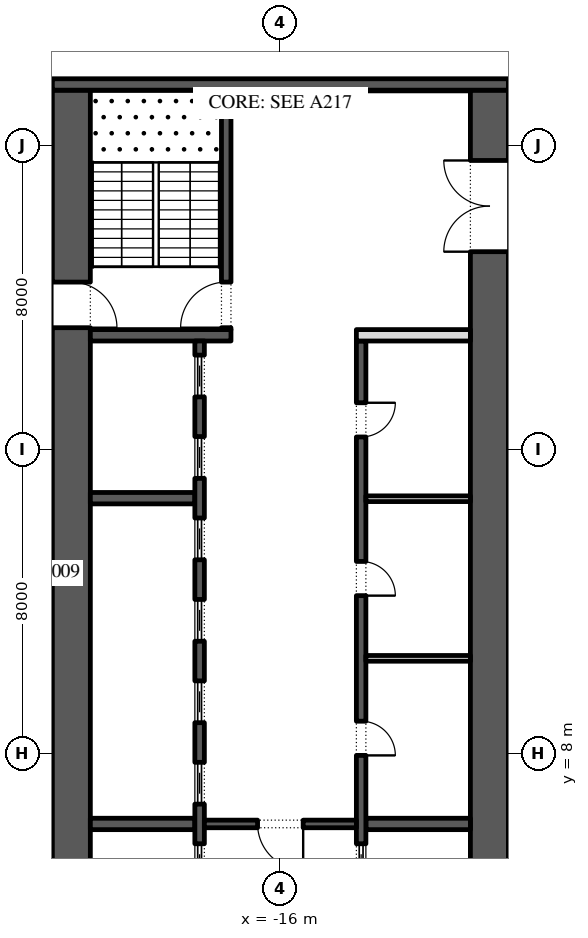
"""IFC4 building model, lengths in metres.
Left out: names, types, materials, properties, quantities, classifications, styles, units other than length and angle.
Written with IfcOpenShell. Run it as: python <this file> out.ifc"""

import sys

from ifc_helpers import new_model, si_unit, direction, frame, frame_2d, origin, place, context, subcontext, project, spatial, rectangle, extrude, element, fill, save


model = new_model("IFC4")
c1 = context("Model", 3, precision=1e-05, world=origin(), true_north=direction((0.0, 1.0)))
c2 = subcontext(c1, "Body", "Model", "MODEL_VIEW")
j1 = project(units=[si_unit("LENGTHUNIT", "METRE"), si_unit("PLANEANGLEUNIT", "RADIAN")], contexts=[c1])
p1 = place(None, origin())
s1 = spatial("IfcSite", under=j1, at=p1, CompositionType="ELEMENT")
p2 = place(p1, origin())
s2 = spatial("IfcBuilding", under=s1, at=p2, CompositionType="ELEMENT")
p3 = place(p2, frame((0.0, 0.0, 69.0)))
s3 = spatial("IfcBuildingStorey", under=s2, at=p3, CompositionType="ELEMENT", Elevation=69.0)
p4 = place(p3, frame((-21.5, -2.45, 0.0), z_axis=(0.0, 0.0, 1.0), x_axis=(0.0, 1.0, 0.0)))
e1 = element("IfcWall", 1, at=p4, inside=s3, PredefinedType="SHEAR", context=c2, shape_type="SweptSolid", body=[
    extrude(rectangle(XDim=27.9, YDim=1.0, at=frame_2d((13.95, 0.0))), origin(), (0.0, 0.0, 1.0), 4.0),
])
p5 = place(p4, frame((5.05, 0.0, 0.0)))
e2 = element("IfcOpeningElement", 2, at=p5, cuts=e1, PredefinedType="OPENING", context=c2, shape_type="SweptSolid", body=[
    extrude(rectangle(XDim=1.2, YDim=2.1, at=frame_2d((0.6, 1.05))), frame((0.0, 0.51, 0.0), z_axis=(0.0, -1.0, 0.0), x_axis=(1.0, 0.0, 0.0)), (0.0, 0.0, 1.0), 1.02),
])
p6 = place(p4, frame((21.65, 0.0, 0.0)))
e3 = element("IfcOpeningElement", 3, at=p6, cuts=e1, PredefinedType="OPENING", context=c2, shape_type="SweptSolid", body=[
    extrude(rectangle(XDim=1.2, YDim=2.1, at=frame_2d((0.6, 1.05))), frame((0.0, 0.51, 0.0), z_axis=(0.0, -1.0, 0.0), x_axis=(1.0, 0.0, 0.0)), (0.0, 0.0, 1.0), 1.02),
])
p7 = place(p3, frame((-10.5, -2.45, 0.0), z_axis=(0.0, 0.0, 1.0), x_axis=(0.0, 1.0, 0.0)))
e4 = element("IfcWall", 4, at=p7, inside=s3, PredefinedType="SHEAR", context=c2, shape_type="SweptSolid", body=[
    extrude(rectangle(XDim=27.9, YDim=1.0, at=frame_2d((13.95, 0.0))), origin(), (0.0, 0.0, 1.0), 4.0),
])
p8 = place(p7, frame((23.65, 0.0, 0.0)))
e5 = element("IfcOpeningElement", 5, at=p8, cuts=e4, PredefinedType="OPENING", context=c2, shape_type="SweptSolid", body=[
    extrude(rectangle(XDim=2.4, YDim=2.1, at=frame_2d((1.2, 1.05))), frame((0.0, 0.51, 0.0), z_axis=(0.0, -1.0, 0.0), x_axis=(1.0, 0.0, 0.0)), (0.0, 0.0, 1.0), 1.02),
])
p9 = place(p7, frame((0.788, 0.0, 0.0)))
e6 = element("IfcOpeningElement", 6, at=p9, cuts=e4, PredefinedType="OPENING", context=c2, shape_type="SweptSolid", body=[
    extrude(rectangle(XDim=0.9, YDim=2.1, at=frame_2d((0.45, 1.05))), frame((0.0, 0.51, 0.0), z_axis=(0.0, -1.0, 0.0), x_axis=(1.0, 0.0, 0.0)), (0.0, 0.0, 1.0), 1.02),
])
p10 = place(p7, frame((4.012, 0.0, 0.0)))
e7 = element("IfcOpeningElement", 7, at=p10, cuts=e4, PredefinedType="OPENING", context=c2, shape_type="SweptSolid", body=[
    extrude(rectangle(XDim=0.9, YDim=2.1, at=frame_2d((0.45, 1.05))), frame((0.0, 0.51, 0.0), z_axis=(0.0, -1.0, 0.0), x_axis=(1.0, 0.0, 0.0)), (0.0, 0.0, 1.0), 1.02),
])
p11 = place(p3, frame((-22.0, 25.6, 0.0), z_axis=(0.0, 0.0, 1.0), x_axis=(1.0, 0.0, 0.0)))
e8 = element("IfcWall", 8, at=p11, inside=s3, PredefinedType="SHEAR", context=c2, shape_type="SweptSolid", body=[
    extrude(rectangle(XDim=12.0, YDim=0.3, at=frame_2d((6.0, 0.0))), origin(), (0.0, 0.0, 1.0), 4.0),
])
p12 = place(p3, frame((-21.0, 19.0, 0.0), z_axis=(0.0, 0.0, 1.0), x_axis=(1.0, 0.0, 0.0)))
e9 = element("IfcWall", 9, at=p12, inside=s3, PredefinedType="SHEAR", context=c2, shape_type="SweptSolid", body=[
    extrude(rectangle(XDim=3.7, YDim=0.3, at=frame_2d((1.85, 0.0))), origin(), (0.0, 0.0, 1.0), 4.0),
])
p13 = place(p3, frame((-17.425, 19.15, 0.0), z_axis=(0.0, 0.0, 1.0), x_axis=(0.0, 1.0, 0.0)))
e10 = element("IfcWall", 10, at=p13, inside=s3, PredefinedType="SHEAR", context=c2, shape_type="SweptSolid", body=[
    extrude(rectangle(XDim=6.3, YDim=0.25, at=frame_2d((3.15, 0.0))), origin(), (0.0, 0.0, 1.0), 4.0),
])
p14 = place(p13, frame((0.05, 0.0, 0.0)))
e11 = element("IfcOpeningElement", 11, at=p14, cuts=e10, PredefinedType="OPENING", context=c2, shape_type="SweptSolid", body=[
    extrude(rectangle(XDim=1.2, YDim=2.1, at=frame_2d((0.6, 1.05))), frame((0.0, 0.135, 0.0), z_axis=(0.0, -1.0, 0.0), x_axis=(1.0, 0.0, 0.0)), (0.0, 0.0, 1.0), 0.27),
])
for number, where, z_axis, x_axis in (
    (12, (-21.0, 6.143, 0.0), (0.0, 0.0, 1.0), (1.0, 0.0, 0.0)),
    (13, (-21.0, 14.714, 0.0), (0.0, 0.0, 1.0), (1.0, 0.0, 0.0)),
):
    element("IfcWall", number, at=place(p3, frame(where, z_axis=z_axis, x_axis=x_axis)), inside=s3, PredefinedType="SHEAR", context=c2, shape_type="SweptSolid", body=[
        extrude(rectangle(XDim=2.75, YDim=0.3, at=frame_2d((1.375, 0.0))), origin(), (0.0, 0.0, 1.0), 4.0),
    ])
p15 = place(p3, frame((-18.125, 4.15, 0.0), z_axis=(0.0, 0.0, 1.0), x_axis=(0.0, 1.0, 0.0)))
e14 = element("IfcWall", 14, at=p15, inside=s3, PredefinedType="SHEAR", context=c2, shape_type="SweptSolid", body=[
    extrude(rectangle(XDim=14.7, YDim=0.25, at=frame_2d((7.35, 0.0))), origin(), (0.0, 0.0, 1.0), 4.0),
])
p16 = place(p15, frame((0.371, 0.0, 0.0)))
e15 = element("IfcOpeningElement", 15, at=p16, cuts=e14, PredefinedType="OPENING", context=c2, shape_type="SweptSolid", body=[
    extrude(rectangle(XDim=1.1, YDim=2.1, at=frame_2d((0.55, 1.05))), frame((0.0, 0.135, 0.0), z_axis=(0.0, -1.0, 0.0), x_axis=(1.0, 0.0, 0.0)), (0.0, 0.0, 1.0), 0.27),
])
p17 = place(p15, frame((2.514, 0.0, 0.0)))
e16 = element("IfcOpeningElement", 16, at=p17, cuts=e14, PredefinedType="OPENING", context=c2, shape_type="SweptSolid", body=[
    extrude(rectangle(XDim=1.1, YDim=2.1, at=frame_2d((0.55, 1.05))), frame((0.0, 0.135, 0.0), z_axis=(0.0, -1.0, 0.0), x_axis=(1.0, 0.0, 0.0)), (0.0, 0.0, 1.0), 0.27),
])
p18 = place(p15, frame((4.657, 0.0, 0.0)))
e17 = element("IfcOpeningElement", 17, at=p18, cuts=e14, PredefinedType="OPENING", context=c2, shape_type="SweptSolid", body=[
    extrude(rectangle(XDim=1.1, YDim=2.1, at=frame_2d((0.55, 1.05))), frame((0.0, 0.135, 0.0), z_axis=(0.0, -1.0, 0.0), x_axis=(1.0, 0.0, 0.0)), (0.0, 0.0, 1.0), 0.27),
])
p19 = place(p15, frame((6.8, 0.0, 0.0)))
e18 = element("IfcOpeningElement", 18, at=p19, cuts=e14, PredefinedType="OPENING", context=c2, shape_type="SweptSolid", body=[
    extrude(rectangle(XDim=1.1, YDim=2.1, at=frame_2d((0.55, 1.05))), frame((0.0, 0.135, 0.0), z_axis=(0.0, -1.0, 0.0), x_axis=(1.0, 0.0, 0.0)), (0.0, 0.0, 1.0), 0.27),
])
p20 = place(p15, frame((8.943, 0.0, 0.0)))
e19 = element("IfcOpeningElement", 19, at=p20, cuts=e14, PredefinedType="OPENING", context=c2, shape_type="SweptSolid", body=[
    extrude(rectangle(XDim=1.1, YDim=2.1, at=frame_2d((0.55, 1.05))), frame((0.0, 0.135, 0.0), z_axis=(0.0, -1.0, 0.0), x_axis=(1.0, 0.0, 0.0)), (0.0, 0.0, 1.0), 0.27),
])
p21 = place(p15, frame((11.086, 0.0, 0.0)))
e20 = element("IfcOpeningElement", 20, at=p21, cuts=e14, PredefinedType="OPENING", context=c2, shape_type="SweptSolid", body=[
    extrude(rectangle(XDim=1.1, YDim=2.1, at=frame_2d((0.55, 1.05))), frame((0.0, 0.135, 0.0), z_axis=(0.0, -1.0, 0.0), x_axis=(1.0, 0.0, 0.0)), (0.0, 0.0, 1.0), 0.27),
])
p22 = place(p15, frame((13.229, 0.0, 0.0)))
e21 = element("IfcOpeningElement", 21, at=p22, cuts=e14, PredefinedType="OPENING", context=c2, shape_type="SweptSolid", body=[
    extrude(rectangle(XDim=1.1, YDim=2.1, at=frame_2d((0.55, 1.05))), frame((0.0, 0.135, 0.0), z_axis=(0.0, -1.0, 0.0), x_axis=(1.0, 0.0, 0.0)), (0.0, 0.0, 1.0), 0.27),
])
p23 = place(p3, frame((-13.75, 6.143, 0.0), z_axis=(0.0, 0.0, 1.0), x_axis=(1.0, 0.0, 0.0)))
e22 = element("IfcWall", 22, at=p23, inside=s3, PredefinedType="SHEAR", context=c2, shape_type="SweptSolid", body=[
    extrude(rectangle(XDim=2.75, YDim=0.3, at=frame_2d((1.375, 0.0))), origin(), (0.0, 0.0, 1.0), 4.0),
])
p24 = place(p3, frame((-13.875, -2.45, 0.0), z_axis=(0.0, 0.0, 1.0), x_axis=(0.0, 1.0, 0.0)))
e23 = element("IfcWall", 23, at=p24, inside=s3, PredefinedType="SHEAR", context=c2, shape_type="SweptSolid", body=[
    extrude(rectangle(XDim=21.3, YDim=0.25, at=frame_2d((10.65, 0.0))), origin(), (0.0, 0.0, 1.0), 4.0),
])
p25 = place(p24, frame((10.396, 0.0, 0.0)))
e24 = element("IfcOpeningElement", 24, at=p25, cuts=e23, PredefinedType="OPENING", context=c2, shape_type="SweptSolid", body=[
    extrude(rectangle(XDim=0.9, YDim=2.1, at=frame_2d((0.45, 1.05))), frame((0.0, 0.135, 0.0), z_axis=(0.0, -1.0, 0.0), x_axis=(1.0, 0.0, 0.0)), (0.0, 0.0, 1.0), 0.27),
])
p26 = place(p24, frame((14.6, 0.0, 0.0)))
e25 = element("IfcOpeningElement", 25, at=p26, cuts=e23, PredefinedType="OPENING", context=c2, shape_type="SweptSolid", body=[
    extrude(rectangle(XDim=0.9, YDim=2.1, at=frame_2d((0.45, 1.05))), frame((0.0, 0.135, 0.0), z_axis=(0.0, -1.0, 0.0), x_axis=(1.0, 0.0, 0.0)), (0.0, 0.0, 1.0), 0.27),
])
p27 = place(p24, frame((18.775, 0.0, 0.0)))
e26 = element("IfcOpeningElement", 26, at=p27, cuts=e23, PredefinedType="OPENING", context=c2, shape_type="SweptSolid", body=[
    extrude(rectangle(XDim=0.9, YDim=2.1, at=frame_2d((0.45, 1.05))), frame((0.0, 0.135, 0.0), z_axis=(0.0, -1.0, 0.0), x_axis=(1.0, 0.0, 0.0)), (0.0, 0.0, 1.0), 0.27),
])
p28 = place(p24, frame((6.971, 0.0, 0.0)))
e27 = element("IfcOpeningElement", 27, at=p28, cuts=e23, PredefinedType="OPENING", context=c2, shape_type="SweptSolid", body=[
    extrude(rectangle(XDim=1.1, YDim=2.1, at=frame_2d((0.55, 1.05))), frame((0.0, 0.135, 0.0), z_axis=(0.0, -1.0, 0.0), x_axis=(1.0, 0.0, 0.0)), (0.0, 0.0, 1.0), 0.27),
])
p29 = place(p3, frame((-14.0, 19.0, 0.0), z_axis=(0.0, 0.0, 1.0), x_axis=(1.0, 0.0, 0.0)))
e28 = element("IfcWall", 28, at=p29, inside=s3, PredefinedType="PARTITIONING", context=c2, shape_type="SweptSolid", body=[
    extrude(rectangle(XDim=3.0, YDim=0.3, at=frame_2d((1.5, 0.0))), origin(), (0.0, 0.0, 1.0), 4.0),
])
for number, where, z_axis, x_axis in (
    (29, (-13.75, 10.5, 0.0), (0.0, 0.0, 1.0), (1.0, 0.0, 0.0)),
    (30, (-13.75, 14.7, 0.0), (0.0, 0.0, 1.0), (1.0, 0.0, 0.0)),
):
    element("IfcWall", number, at=place(p3, frame(where, z_axis=z_axis, x_axis=x_axis)), inside=s3, PredefinedType="PARTITIONING", context=c2, shape_type="SweptSolid", body=[
        extrude(rectangle(XDim=2.75, YDim=0.15, at=frame_2d((1.375, 0.0))), origin(), (0.0, 0.0, 1.0), 4.0),
    ])
p30 = place(p3, frame((-18.0, 6.143, 0.0), z_axis=(0.0, 0.0, 1.0), x_axis=(1.0, 0.0, 0.0)))
e31 = element("IfcWall", 31, at=p30, inside=s3, PredefinedType="SHEAR", context=c2, shape_type="SweptSolid", body=[
    extrude(rectangle(XDim=4.0, YDim=0.2, at=frame_2d((2.0, 0.0))), origin(), (0.0, 0.0, 1.0), 4.0),
])
p31 = place(p30, frame((1.4, 0.0, 0.0)))
e32 = element("IfcOpeningElement", 32, at=p31, cuts=e31, PredefinedType="OPENING", context=c2, shape_type="SweptSolid", body=[
    extrude(rectangle(XDim=1.2, YDim=2.1, at=frame_2d((0.6, 1.05))), frame((0.0, 0.11, 0.0), z_axis=(0.0, -1.0, 0.0), x_axis=(1.0, 0.0, 0.0)), (0.0, 0.0, 1.0), 0.22),
])
p32 = place(p16, origin())
e33 = element("IfcDoor", 33, at=p32, inside=s3, OperationType="SLIDING_TO_LEFT", PredefinedType="DOOR", context=c2, shape_type="SweptSolid", body=[
    extrude(rectangle(XDim=1.1, YDim=2.1, at=frame_2d((0.55, 1.05))), frame((0.0, 0.025, 0.0), z_axis=(0.0, -1.0, 0.0), x_axis=(1.0, 0.0, 0.0)), (0.0, 0.0, 1.0), 0.05),
])
fill(e15, e33)
p33 = place(p17, origin())
e34 = element("IfcDoor", 34, at=p33, inside=s3, OperationType="SLIDING_TO_LEFT", PredefinedType="DOOR", context=c2, shape_type="SweptSolid", body=[
    extrude(rectangle(XDim=1.1, YDim=2.1, at=frame_2d((0.55, 1.05))), frame((0.0, 0.025, 0.0), z_axis=(0.0, -1.0, 0.0), x_axis=(1.0, 0.0, 0.0)), (0.0, 0.0, 1.0), 0.05),
])
fill(e16, e34)
p34 = place(p18, origin())
e35 = element("IfcDoor", 35, at=p34, inside=s3, OperationType="SLIDING_TO_LEFT", PredefinedType="DOOR", context=c2, shape_type="SweptSolid", body=[
    extrude(rectangle(XDim=1.1, YDim=2.1, at=frame_2d((0.55, 1.05))), frame((0.0, 0.025, 0.0), z_axis=(0.0, -1.0, 0.0), x_axis=(1.0, 0.0, 0.0)), (0.0, 0.0, 1.0), 0.05),
])
fill(e17, e35)
p35 = place(p19, origin())
e36 = element("IfcDoor", 36, at=p35, inside=s3, OperationType="SLIDING_TO_LEFT", PredefinedType="DOOR", context=c2, shape_type="SweptSolid", body=[
    extrude(rectangle(XDim=1.1, YDim=2.1, at=frame_2d((0.55, 1.05))), frame((0.0, 0.025, 0.0), z_axis=(0.0, -1.0, 0.0), x_axis=(1.0, 0.0, 0.0)), (0.0, 0.0, 1.0), 0.05),
])
fill(e18, e36)
p36 = place(p20, origin())
e37 = element("IfcDoor", 37, at=p36, inside=s3, OperationType="SLIDING_TO_LEFT", PredefinedType="DOOR", context=c2, shape_type="SweptSolid", body=[
    extrude(rectangle(XDim=1.1, YDim=2.1, at=frame_2d((0.55, 1.05))), frame((0.0, 0.025, 0.0), z_axis=(0.0, -1.0, 0.0), x_axis=(1.0, 0.0, 0.0)), (0.0, 0.0, 1.0), 0.05),
])
fill(e19, e37)
p37 = place(p21, origin())
e38 = element("IfcDoor", 38, at=p37, inside=s3, OperationType="SLIDING_TO_LEFT", PredefinedType="DOOR", context=c2, shape_type="SweptSolid", body=[
    extrude(rectangle(XDim=1.1, YDim=2.1, at=frame_2d((0.55, 1.05))), frame((0.0, 0.025, 0.0), z_axis=(0.0, -1.0, 0.0), x_axis=(1.0, 0.0, 0.0)), (0.0, 0.0, 1.0), 0.05),
])
fill(e20, e38)
p38 = place(p22, origin())
e39 = element("IfcDoor", 39, at=p38, inside=s3, OperationType="SLIDING_TO_LEFT", PredefinedType="DOOR", context=c2, shape_type="SweptSolid", body=[
    extrude(rectangle(XDim=1.1, YDim=2.1, at=frame_2d((0.55, 1.05))), frame((0.0, 0.025, 0.0), z_axis=(0.0, -1.0, 0.0), x_axis=(1.0, 0.0, 0.0)), (0.0, 0.0, 1.0), 0.05),
])
fill(e21, e39)
p39 = place(p25, frame((0.9, -0.2, 0.0), z_axis=(0.0, 0.0, 1.0), x_axis=(-1.0, 0.0, 0.0)))
e40 = element("IfcDoor", 40, at=p39, inside=s3, OperationType="SINGLE_SWING_LEFT", PredefinedType="DOOR", context=c2, shape_type="SweptSolid", body=[
    extrude(rectangle(XDim=0.9, YDim=2.1, at=frame_2d((0.45, 1.05))), frame((0.0, -0.075, 0.0), z_axis=(0.0, -1.0, 0.0), x_axis=(1.0, 0.0, 0.0)), (0.0, 0.0, 1.0), 0.05),
])
fill(e24, e40)
p40 = place(p26, frame((0.9, -0.2, 0.0), z_axis=(0.0, 0.0, 1.0), x_axis=(-1.0, 0.0, 0.0)))
e41 = element("IfcDoor", 41, at=p40, inside=s3, OperationType="SINGLE_SWING_LEFT", PredefinedType="DOOR", context=c2, shape_type="SweptSolid", body=[
    extrude(rectangle(XDim=0.9, YDim=2.1, at=frame_2d((0.45, 1.05))), frame((0.0, -0.075, 0.0), z_axis=(0.0, -1.0, 0.0), x_axis=(1.0, 0.0, 0.0)), (0.0, 0.0, 1.0), 0.05),
])
fill(e25, e41)
p41 = place(p27, frame((0.9, -0.2, 0.0), z_axis=(0.0, 0.0, 1.0), x_axis=(-1.0, 0.0, 0.0)))
e42 = element("IfcDoor", 42, at=p41, inside=s3, OperationType="SINGLE_SWING_RIGHT", PredefinedType="DOOR", context=c2, shape_type="SweptSolid", body=[
    extrude(rectangle(XDim=0.9, YDim=2.1, at=frame_2d((0.45, 1.05))), frame((0.0, -0.075, 0.0), z_axis=(0.0, -1.0, 0.0), x_axis=(1.0, 0.0, 0.0)), (0.0, 0.0, 1.0), 0.05),
])
fill(e26, e42)
p42 = place(p28, origin())
e43 = element("IfcDoor", 43, at=p42, inside=s3, OperationType="SLIDING_TO_LEFT", PredefinedType="DOOR", context=c2, shape_type="SweptSolid", body=[
    extrude(rectangle(XDim=1.1, YDim=2.1, at=frame_2d((0.55, 1.05))), frame((0.0, 0.025, 0.0), z_axis=(0.0, -1.0, 0.0), x_axis=(1.0, 0.0, 0.0)), (0.0, 0.0, 1.0), 0.05),
])
fill(e27, e43)
p43 = place(p31, frame((1.2, 0.0, 0.0), z_axis=(0.0, 0.0, 1.0), x_axis=(-1.0, 0.0, 0.0)))
e44 = element("IfcDoor", 44, at=p43, inside=s3, OperationType="SINGLE_SWING_RIGHT", PredefinedType="DOOR", context=c2, shape_type="SweptSolid", body=[
    extrude(rectangle(XDim=1.2, YDim=2.1, at=frame_2d((0.6, 1.05))), frame((0.0, 0.025, 0.0), z_axis=(0.0, -1.0, 0.0), x_axis=(1.0, 0.0, 0.0)), (0.0, 0.0, 1.0), 0.05),
])
fill(e32, e44)
p44 = place(p8, origin())
e45 = element("IfcDoor", 45, at=p44, inside=s3, OperationType="DOUBLE_DOOR_SINGLE_SWING", PredefinedType="DOOR", context=c2, shape_type="SweptSolid", body=[
    extrude(rectangle(XDim=2.4, YDim=2.1, at=frame_2d((1.2, 1.05))), frame((0.0, 0.025, 0.0), z_axis=(0.0, -1.0, 0.0), x_axis=(1.0, 0.0, 0.0)), (0.0, 0.0, 1.0), 0.05),
])
fill(e5, e45)
p45 = place(p14, origin())
e46 = element("IfcDoor", 46, at=p45, inside=s3, OperationType="SINGLE_SWING_RIGHT", PredefinedType="DOOR", context=c2, shape_type="SweptSolid", body=[
    extrude(rectangle(XDim=1.2, YDim=2.1, at=frame_2d((0.6, 1.05))), frame((0.0, 0.025, 0.0), z_axis=(0.0, -1.0, 0.0), x_axis=(1.0, 0.0, 0.0)), (0.0, 0.0, 1.0), 0.05),
])
fill(e11, e46)
p46 = place(p6, frame((1.2, 0.0, 0.0), z_axis=(0.0, 0.0, 1.0), x_axis=(-1.0, 0.0, 0.0)))
e47 = element("IfcDoor", 47, at=p46, inside=s3, OperationType="SINGLE_SWING_LEFT", PredefinedType="DOOR", context=c2, shape_type="SweptSolid", body=[
    extrude(rectangle(XDim=1.2, YDim=2.1, at=frame_2d((0.6, 1.05))), frame((0.0, 0.025, 0.0), z_axis=(0.0, -1.0, 0.0), x_axis=(1.0, 0.0, 0.0)), (0.0, 0.0, 1.0), 0.05),
])
fill(e3, e47)
save(model, sys.argv[1])
